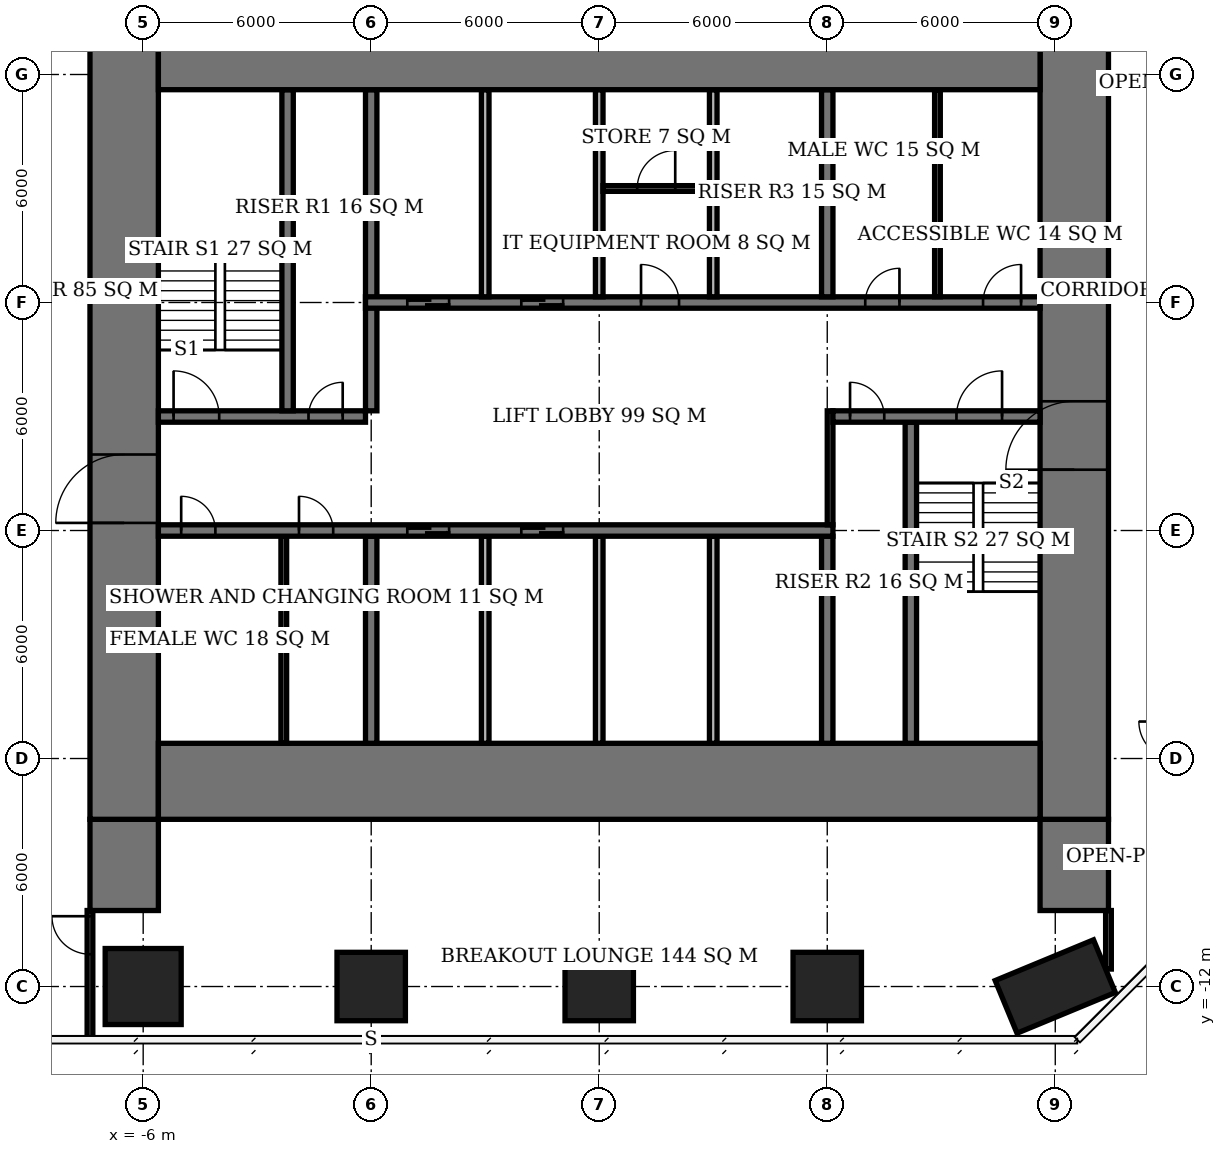
"""IFC4 building model, lengths in metres.
Left out: names, types, materials, properties, quantities, classifications, styles, units other than length and angle.
Written with IfcOpenShell. Run it as: python <this file> out.ifc"""

import sys

from ifc_helpers import new_model, si_unit, direction, frame, frame_2d, origin, origin_2d, place, context, subcontext, project, spatial, rectangle, extrude, element, fill, save


model = new_model("IFC4")
c1 = context("Model", 3, precision=1e-05, world=origin(), true_north=direction((0.0, 1.0)))
c2 = subcontext(c1, "Body", "Model", "MODEL_VIEW")
j1 = project(units=[si_unit("LENGTHUNIT", "METRE"), si_unit("PLANEANGLEUNIT", "RADIAN")], contexts=[c1])
p1 = place(None, origin())
s1 = spatial("IfcSite", under=j1, at=p1, CompositionType="ELEMENT")
p2 = place(p1, origin())
s2 = spatial("IfcBuilding", under=s1, at=p2, CompositionType="ELEMENT")
p3 = place(p2, frame((0.0, 0.0, 105.5)))
s3 = spatial("IfcBuildingStorey", under=s2, at=p3, CompositionType="ELEMENT", Elevation=105.5)
p4 = place(p3, frame((-6.0, -12.0, 0.0), z_axis=(0.0, 0.0, 1.0), x_axis=(1.0, 0.0, 0.0)))
e1 = element("IfcColumn", 1, at=p4, inside=s3, PredefinedType="COLUMN", context=c2, shape_type="SweptSolid", body=[
    extrude(rectangle(XDim=2.0, YDim=2.0, at=origin_2d()), origin(), (0.0, 0.0, 1.0), 3.9),
])
for number, where, z_axis, x_axis in (
    (2, (0.0, -12.0, 0.0), (0.0, 0.0, 1.0), (1.0, 0.0, 0.0)),
    (3, (6.0, -12.0, 0.0), (0.0, 0.0, 1.0), (1.0, 0.0, 0.0)),
    (4, (12.0, -12.0, 0.0), (0.0, 0.0, 1.0), (1.0, 0.0, 0.0)),
):
    element("IfcColumn", number, at=place(p3, frame(where, z_axis=z_axis, x_axis=x_axis)), inside=s3, PredefinedType="COLUMN", context=c2, shape_type="SweptSolid", body=[
        extrude(rectangle(XDim=1.8, YDim=1.8, at=origin_2d()), origin(), (0.0, 0.0, 1.0), 3.9),
    ])
p5 = place(p3, frame((18.0, -12.0, 0.0), z_axis=(0.0, 0.0, 1.0), x_axis=(-0.923879532511, -0.382683432365, 0.0)))
e5 = element("IfcColumn", 5, at=p5, inside=s3, PredefinedType="COLUMN", context=c2, shape_type="SweptSolid", body=[
    extrude(rectangle(XDim=2.8, YDim=1.5, at=origin_2d()), origin(), (0.0, 0.0, 1.0), 3.9),
])
for number, where, z_axis, x_axis in (
    (6, (-5.6, -6.6, 0.0), (0.0, 0.0, 1.0), (1.0, 0.0, 0.0)),
    (7, (-5.6, 12.6, 0.0), (0.0, 0.0, 1.0), (1.0, 0.0, 0.0)),
):
    element("IfcWall", number, at=place(p3, frame(where, z_axis=z_axis, x_axis=x_axis)), inside=s3, PredefinedType="SHEAR", context=c2, shape_type="SweptSolid", body=[
        extrude(rectangle(XDim=23.2, YDim=2.0, at=frame_2d((11.6, 0.0))), origin(), (0.0, 0.0, 1.0), 3.9),
    ])
p6 = place(p3, frame((-6.5, -7.6, 0.0), z_axis=(0.0, 0.0, 1.0), x_axis=(0.0, 1.0, 0.0)))
e8 = element("IfcWall", 8, at=p6, inside=s3, PredefinedType="SHEAR", context=c2, shape_type="SweptSolid", body=[
    extrude(rectangle(XDim=21.2, YDim=1.8, at=frame_2d((10.6, 0.0))), origin(), (0.0, 0.0, 1.0), 3.9),
])
p7 = place(p6, frame((7.8, 0.0, 0.0)))
e9 = element("IfcOpeningElement", 9, at=p7, cuts=e8, PredefinedType="OPENING", context=c2, shape_type="SweptSolid", body=[
    extrude(rectangle(XDim=1.8, YDim=2.4, at=frame_2d((0.9, 1.2))), frame((0.0, 0.91, 0.0), z_axis=(0.0, -1.0, 0.0), x_axis=(1.0, 0.0, 0.0)), (0.0, 0.0, 1.0), 1.82),
])
p8 = place(p3, frame((18.5, -7.6, 0.0), z_axis=(0.0, 0.0, 1.0), x_axis=(0.0, 1.0, 0.0)))
e10 = element("IfcWall", 10, at=p8, inside=s3, PredefinedType="SHEAR", context=c2, shape_type="SweptSolid", body=[
    extrude(rectangle(XDim=21.2, YDim=1.8, at=frame_2d((10.6, 0.0))), origin(), (0.0, 0.0, 1.0), 3.9),
])
p9 = place(p8, frame((9.2, 0.0, 0.0)))
e11 = element("IfcOpeningElement", 11, at=p9, cuts=e10, PredefinedType="OPENING", context=c2, shape_type="SweptSolid", body=[
    extrude(rectangle(XDim=1.8, YDim=2.4, at=frame_2d((0.9, 1.2))), frame((0.0, 0.91, 0.0), z_axis=(0.0, -1.0, 0.0), x_axis=(1.0, 0.0, 0.0)), (0.0, 0.0, 1.0), 1.82),
])
for number, where, z_axis, x_axis in (
    (12, (-6.5, -10.0, 0.0), (0.0, 0.0, 1.0), (0.0, 1.0, 0.0)),
    (13, (18.5, -10.0, 0.0), (0.0, 0.0, 1.0), (0.0, 1.0, 0.0)),
):
    element("IfcWall", number, at=place(p3, frame(where, z_axis=z_axis, x_axis=x_axis)), inside=s3, PredefinedType="SHEAR", context=c2, shape_type="SweptSolid", body=[
        extrude(rectangle(XDim=2.4, YDim=1.8, at=frame_2d((1.2, 0.0))), origin(), (0.0, 0.0, 1.0), 3.9),
    ])
p10 = place(p3, frame((-5.6, 0.0, 0.0), z_axis=(0.0, 0.0, 1.0), x_axis=(1.0, 0.0, 0.0)))
e14 = element("IfcWall", 14, at=p10, inside=s3, PredefinedType="SHEAR", context=c2, shape_type="SweptSolid", body=[
    extrude(rectangle(XDim=17.75, YDim=0.3, at=frame_2d((8.875, 0.0))), origin(), (0.0, 0.0, 1.0), 3.9),
])
p11 = place(p10, frame((0.6, 0.0, 0.0)))
e15 = element("IfcOpeningElement", 15, at=p11, cuts=e14, PredefinedType="OPENING", context=c2, shape_type="SweptSolid", body=[
    extrude(rectangle(XDim=0.9, YDim=2.1, at=frame_2d((0.45, 1.05))), frame((0.0, 0.16, 0.0), z_axis=(0.0, -1.0, 0.0), x_axis=(1.0, 0.0, 0.0)), (0.0, 0.0, 1.0), 0.32),
])
p12 = place(p10, frame((3.7, 0.0, 0.0)))
e16 = element("IfcOpeningElement", 16, at=p12, cuts=e14, PredefinedType="OPENING", context=c2, shape_type="SweptSolid", body=[
    extrude(rectangle(XDim=0.9, YDim=2.1, at=frame_2d((0.45, 1.05))), frame((0.0, 0.16, 0.0), z_axis=(0.0, -1.0, 0.0), x_axis=(1.0, 0.0, 0.0)), (0.0, 0.0, 1.0), 0.32),
])
p13 = place(p10, frame((6.55, 0.0, 0.0)))
e17 = element("IfcOpeningElement", 17, at=p13, cuts=e14, PredefinedType="OPENING", context=c2, shape_type="SweptSolid", body=[
    extrude(rectangle(XDim=1.1, YDim=2.1, at=frame_2d((0.55, 1.05))), frame((0.0, 0.16, 0.0), z_axis=(0.0, -1.0, 0.0), x_axis=(1.0, 0.0, 0.0)), (0.0, 0.0, 1.0), 0.32),
])
p14 = place(p10, frame((9.55, 0.0, 0.0)))
e18 = element("IfcOpeningElement", 18, at=p14, cuts=e14, PredefinedType="OPENING", context=c2, shape_type="SweptSolid", body=[
    extrude(rectangle(XDim=1.1, YDim=2.1, at=frame_2d((0.55, 1.05))), frame((0.0, 0.16, 0.0), z_axis=(0.0, -1.0, 0.0), x_axis=(1.0, 0.0, 0.0)), (0.0, 0.0, 1.0), 0.32),
])
p15 = place(p3, frame((-5.6, 3.0, 0.0), z_axis=(0.0, 0.0, 1.0), x_axis=(1.0, 0.0, 0.0)))
e19 = element("IfcWall", 19, at=p15, inside=s3, PredefinedType="SHEAR", context=c2, shape_type="SweptSolid", body=[
    extrude(rectangle(XDim=5.45, YDim=0.3, at=frame_2d((2.725, 0.0))), origin(), (0.0, 0.0, 1.0), 3.9),
])
p16 = place(p15, frame((0.4, 0.0, 0.0)))
e20 = element("IfcOpeningElement", 20, at=p16, cuts=e19, PredefinedType="OPENING", context=c2, shape_type="SweptSolid", body=[
    extrude(rectangle(XDim=1.2, YDim=2.1, at=frame_2d((0.6, 1.05))), frame((0.0, 0.16, 0.0), z_axis=(0.0, -1.0, 0.0), x_axis=(1.0, 0.0, 0.0)), (0.0, 0.0, 1.0), 0.32),
])
p17 = place(p15, frame((3.95, 0.0, 0.0)))
e21 = element("IfcOpeningElement", 21, at=p17, cuts=e19, PredefinedType="OPENING", context=c2, shape_type="SweptSolid", body=[
    extrude(rectangle(XDim=0.9, YDim=2.1, at=frame_2d((0.45, 1.05))), frame((0.0, 0.16, 0.0), z_axis=(0.0, -1.0, 0.0), x_axis=(1.0, 0.0, 0.0)), (0.0, 0.0, 1.0), 0.32),
])
p18 = place(p3, frame((12.15, 3.0, 0.0), z_axis=(0.0, 0.0, 1.0), x_axis=(1.0, 0.0, 0.0)))
e22 = element("IfcWall", 22, at=p18, inside=s3, PredefinedType="SHEAR", context=c2, shape_type="SweptSolid", body=[
    extrude(rectangle(XDim=5.45, YDim=0.3, at=frame_2d((2.725, 0.0))), origin(), (0.0, 0.0, 1.0), 3.9),
])
p19 = place(p18, frame((3.25, 0.0, 0.0)))
e23 = element("IfcOpeningElement", 23, at=p19, cuts=e22, PredefinedType="OPENING", context=c2, shape_type="SweptSolid", body=[
    extrude(rectangle(XDim=1.2, YDim=2.1, at=frame_2d((0.6, 1.05))), frame((0.0, 0.16, 0.0), z_axis=(0.0, -1.0, 0.0), x_axis=(1.0, 0.0, 0.0)), (0.0, 0.0, 1.0), 0.32),
])
p20 = place(p18, frame((0.45, 0.0, 0.0)))
e24 = element("IfcOpeningElement", 24, at=p20, cuts=e22, PredefinedType="OPENING", context=c2, shape_type="SweptSolid", body=[
    extrude(rectangle(XDim=0.9, YDim=2.1, at=frame_2d((0.45, 1.05))), frame((0.0, 0.16, 0.0), z_axis=(0.0, -1.0, 0.0), x_axis=(1.0, 0.0, 0.0)), (0.0, 0.0, 1.0), 0.32),
])
p21 = place(p3, frame((-0.15, 6.0, 0.0), z_axis=(0.0, 0.0, 1.0), x_axis=(1.0, 0.0, 0.0)))
e25 = element("IfcWall", 25, at=p21, inside=s3, PredefinedType="SHEAR", context=c2, shape_type="SweptSolid", body=[
    extrude(rectangle(XDim=17.75, YDim=0.3, at=frame_2d((8.875, 0.0))), origin(), (0.0, 0.0, 1.0), 3.9),
])
p22 = place(p21, frame((13.15, 0.0, 0.0)))
e26 = element("IfcOpeningElement", 26, at=p22, cuts=e25, PredefinedType="OPENING", context=c2, shape_type="SweptSolid", body=[
    extrude(rectangle(XDim=0.9, YDim=2.1, at=frame_2d((0.45, 1.05))), frame((0.0, 0.16, 0.0), z_axis=(0.0, -1.0, 0.0), x_axis=(1.0, 0.0, 0.0)), (0.0, 0.0, 1.0), 0.32),
])
p23 = place(p21, frame((16.25, 0.0, 0.0)))
e27 = element("IfcOpeningElement", 27, at=p23, cuts=e25, PredefinedType="OPENING", context=c2, shape_type="SweptSolid", body=[
    extrude(rectangle(XDim=1.0, YDim=2.1, at=frame_2d((0.5, 1.05))), frame((0.0, 0.16, 0.0), z_axis=(0.0, -1.0, 0.0), x_axis=(1.0, 0.0, 0.0)), (0.0, 0.0, 1.0), 0.32),
])
p24 = place(p21, frame((7.25, 0.0, 0.0)))
e28 = element("IfcOpeningElement", 28, at=p24, cuts=e25, PredefinedType="OPENING", context=c2, shape_type="SweptSolid", body=[
    extrude(rectangle(XDim=1.0, YDim=2.1, at=frame_2d((0.5, 1.05))), frame((0.0, 0.16, 0.0), z_axis=(0.0, -1.0, 0.0), x_axis=(1.0, 0.0, 0.0)), (0.0, 0.0, 1.0), 0.32),
])
p25 = place(p21, frame((1.1, 0.0, 0.0)))
e29 = element("IfcOpeningElement", 29, at=p25, cuts=e25, PredefinedType="OPENING", context=c2, shape_type="SweptSolid", body=[
    extrude(rectangle(XDim=1.1, YDim=2.1, at=frame_2d((0.55, 1.05))), frame((0.0, 0.16, 0.0), z_axis=(0.0, -1.0, 0.0), x_axis=(1.0, 0.0, 0.0)), (0.0, 0.0, 1.0), 0.32),
])
p26 = place(p21, frame((4.1, 0.0, 0.0)))
e30 = element("IfcOpeningElement", 30, at=p26, cuts=e25, PredefinedType="OPENING", context=c2, shape_type="SweptSolid", body=[
    extrude(rectangle(XDim=1.1, YDim=2.1, at=frame_2d((0.55, 1.05))), frame((0.0, 0.16, 0.0), z_axis=(0.0, -1.0, 0.0), x_axis=(1.0, 0.0, 0.0)), (0.0, 0.0, 1.0), 0.32),
])
p27 = place(p3, frame((0.0, -5.6, 0.0), z_axis=(0.0, 0.0, 1.0), x_axis=(0.0, 1.0, 0.0)))
e31 = element("IfcWall", 31, at=p27, inside=s3, PredefinedType="SHEAR", context=c2, shape_type="SweptSolid", body=[
    extrude(rectangle(XDim=5.45, YDim=0.3, at=frame_2d((2.725, 0.0))), origin(), (0.0, 0.0, 1.0), 3.9),
])
p28 = place(p3, frame((0.0, 3.15, 0.0), z_axis=(0.0, 0.0, 1.0), x_axis=(0.0, 1.0, 0.0)))
e32 = element("IfcWall", 32, at=p28, inside=s3, PredefinedType="SHEAR", context=c2, shape_type="SweptSolid", body=[
    extrude(rectangle(XDim=8.45, YDim=0.3, at=frame_2d((4.225, 0.0))), origin(), (0.0, 0.0, 1.0), 3.9),
])
for number, where, z_axis, x_axis in (
    (33, (12.0, -5.6, 0.0), (0.0, 0.0, 1.0), (0.0, 1.0, 0.0)),
    (34, (12.0, 6.15, 0.0), (0.0, 0.0, 1.0), (0.0, 1.0, 0.0)),
):
    element("IfcWall", number, at=place(p3, frame(where, z_axis=z_axis, x_axis=x_axis)), inside=s3, PredefinedType="SHEAR", context=c2, shape_type="SweptSolid", body=[
        extrude(rectangle(XDim=5.45, YDim=0.3, at=frame_2d((2.725, 0.0))), origin(), (0.0, 0.0, 1.0), 3.9),
    ])
for number, where, z_axis, x_axis in (
    (35, (-2.2, 3.15, 0.0), (0.0, 0.0, 1.0), (0.0, 1.0, 0.0)),
    (36, (14.2, -5.6, 0.0), (0.0, 0.0, 1.0), (0.0, 1.0, 0.0)),
):
    element("IfcWall", number, at=place(p3, frame(where, z_axis=z_axis, x_axis=x_axis)), inside=s3, PredefinedType="SHEAR", context=c2, shape_type="SweptSolid", body=[
        extrude(rectangle(XDim=8.45, YDim=0.3, at=frame_2d((4.225, 0.0))), origin(), (0.0, 0.0, 1.0), 3.9),
    ])
for number, where, z_axis, x_axis in (
    (37, (3.0, 6.15, 0.0), (0.0, 0.0, 1.0), (0.0, 1.0, 0.0)),
    (38, (6.0, 6.15, 0.0), (0.0, 0.0, 1.0), (0.0, 1.0, 0.0)),
    (39, (9.0, 6.15, 0.0), (0.0, 0.0, 1.0), (0.0, 1.0, 0.0)),
    (40, (3.0, -5.6, 0.0), (0.0, 0.0, 1.0), (0.0, 1.0, 0.0)),
    (41, (6.0, -5.6, 0.0), (0.0, 0.0, 1.0), (0.0, 1.0, 0.0)),
    (42, (9.0, -5.6, 0.0), (0.0, 0.0, 1.0), (0.0, 1.0, 0.0)),
):
    element("IfcWall", number, at=place(p3, frame(where, z_axis=z_axis, x_axis=x_axis)), inside=s3, PredefinedType="SOLIDWALL", context=c2, shape_type="SweptSolid", body=[
        extrude(rectangle(XDim=5.45, YDim=0.2, at=frame_2d((2.725, 0.0))), origin(), (0.0, 0.0, 1.0), 3.9),
    ])
for number, where, z_axis, x_axis in (
    (43, (-2.3, -5.6, 0.0), (0.0, 0.0, 1.0), (0.0, 1.0, 0.0)),
    (44, (14.9, 6.15, 0.0), (0.0, 0.0, 1.0), (0.0, 1.0, 0.0)),
):
    element("IfcWall", number, at=place(p3, frame(where, z_axis=z_axis, x_axis=x_axis)), inside=s3, PredefinedType="PLUMBINGWALL", context=c2, shape_type="SweptSolid", body=[
        extrude(rectangle(XDim=5.45, YDim=0.15, at=frame_2d((2.725, 0.0))), origin(), (0.0, 0.0, 1.0), 3.65),
    ])
p29 = place(p3, frame((6.1, 9.0, 0.0), z_axis=(0.0, 0.0, 1.0), x_axis=(1.0, 0.0, 0.0)))
e45 = element("IfcWall", 45, at=p29, inside=s3, PredefinedType="PARTITIONING", context=c2, shape_type="SweptSolid", body=[
    extrude(rectangle(XDim=2.8, YDim=0.15, at=frame_2d((1.4, 0.0))), origin(), (0.0, 0.0, 1.0), 3.65),
])
p30 = place(p29, frame((0.9, 0.0, 0.0)))
e46 = element("IfcOpeningElement", 46, at=p30, cuts=e45, PredefinedType="OPENING", context=c2, shape_type="SweptSolid", body=[
    extrude(rectangle(XDim=1.0, YDim=2.1, at=frame_2d((0.5, 1.05))), frame((0.0, 0.085, 0.0), z_axis=(0.0, -1.0, 0.0), x_axis=(1.0, 0.0, 0.0)), (0.0, 0.0, 1.0), 0.17),
])
p31 = place(p3, frame((-7.4, -13.4, 0.0), z_axis=(0.0, 0.0, 1.0), x_axis=(0.0, 1.0, 0.0)))
e47 = element("IfcWall", 47, at=p31, inside=s3, PredefinedType="PARTITIONING", context=c2, shape_type="SweptSolid", body=[
    extrude(rectangle(XDim=3.4, YDim=0.15, at=frame_2d((1.7, 0.0))), origin(), (0.0, 0.0, 1.0), 3.65),
])
p32 = place(p31, frame((2.25, 0.0, 0.0)))
e48 = element("IfcOpeningElement", 48, at=p32, cuts=e47, PredefinedType="OPENING", context=c2, shape_type="SweptSolid", body=[
    extrude(rectangle(XDim=1.0, YDim=2.1, at=frame_2d((0.5, 1.05))), frame((0.0, 0.085, 0.0), z_axis=(0.0, -1.0, 0.0), x_axis=(1.0, 0.0, 0.0)), (0.0, 0.0, 1.0), 0.17),
])
p33 = place(p3, frame((19.4, -11.541, 0.0), z_axis=(0.0, 0.0, 1.0), x_axis=(0.0, 1.0, 0.0)))
e49 = element("IfcWall", 49, at=p33, inside=s3, PredefinedType="PARTITIONING", context=c2, shape_type="SweptSolid", body=[
    extrude(rectangle(XDim=1.541, YDim=0.15, at=frame_2d((0.77, 0.0))), origin(), (0.0, 0.0, 1.0), 3.65),
])
p34 = place(p3, frame((12.075, 0.15, 0.0), z_axis=(0.0, 0.0, 1.0), x_axis=(0.0, 1.0, 0.0)))
e50 = element("IfcWall", 50, at=p34, inside=s3, PredefinedType="PARTITIONING", context=c2, shape_type="SweptSolid", body=[
    extrude(rectangle(XDim=3.0, YDim=0.15, at=frame_2d((1.5, 0.0))), origin(), (0.0, 0.0, 1.0), 3.65),
])
p35 = place(p7, origin())
e51 = element("IfcDoor", 51, at=p35, inside=s3, OperationType="DOUBLE_DOOR_SINGLE_SWING", PredefinedType="DOOR", context=c2, shape_type="SweptSolid", body=[
    extrude(rectangle(XDim=1.8, YDim=2.4, at=frame_2d((0.9, 1.2))), frame((0.0, 0.025, 0.0), z_axis=(0.0, -1.0, 0.0), x_axis=(1.0, 0.0, 0.0)), (0.0, 0.0, 1.0), 0.05),
])
fill(e9, e51)
p36 = place(p9, origin())
e52 = element("IfcDoor", 52, at=p36, inside=s3, OperationType="DOUBLE_DOOR_SINGLE_SWING", PredefinedType="DOOR", context=c2, shape_type="SweptSolid", body=[
    extrude(rectangle(XDim=1.8, YDim=2.4, at=frame_2d((0.9, 1.2))), frame((0.0, 0.025, 0.0), z_axis=(0.0, -1.0, 0.0), x_axis=(1.0, 0.0, 0.0)), (0.0, 0.0, 1.0), 0.05),
])
fill(e11, e52)
p37 = place(p16, origin())
e53 = element("IfcDoor", 53, at=p37, inside=s3, OperationType="SINGLE_SWING_LEFT", PredefinedType="DOOR", context=c2, shape_type="SweptSolid", body=[
    extrude(rectangle(XDim=1.2, YDim=2.1, at=frame_2d((0.6, 1.05))), frame((0.0, 0.025, 0.0), z_axis=(0.0, -1.0, 0.0), x_axis=(1.0, 0.0, 0.0)), (0.0, 0.0, 1.0), 0.05),
])
fill(e20, e53)
p38 = place(p17, origin())
e54 = element("IfcDoor", 54, at=p38, inside=s3, OperationType="SINGLE_SWING_RIGHT", PredefinedType="DOOR", context=c2, shape_type="SweptSolid", body=[
    extrude(rectangle(XDim=0.9, YDim=2.1, at=frame_2d((0.45, 1.05))), frame((0.0, 0.025, 0.0), z_axis=(0.0, -1.0, 0.0), x_axis=(1.0, 0.0, 0.0)), (0.0, 0.0, 1.0), 0.05),
])
fill(e21, e54)
p39 = place(p19, origin())
e55 = element("IfcDoor", 55, at=p39, inside=s3, OperationType="SINGLE_SWING_RIGHT", PredefinedType="DOOR", context=c2, shape_type="SweptSolid", body=[
    extrude(rectangle(XDim=1.2, YDim=2.1, at=frame_2d((0.6, 1.05))), frame((0.0, 0.025, 0.0), z_axis=(0.0, -1.0, 0.0), x_axis=(1.0, 0.0, 0.0)), (0.0, 0.0, 1.0), 0.05),
])
fill(e23, e55)
p40 = place(p20, origin())
e56 = element("IfcDoor", 56, at=p40, inside=s3, OperationType="SINGLE_SWING_LEFT", PredefinedType="DOOR", context=c2, shape_type="SweptSolid", body=[
    extrude(rectangle(XDim=0.9, YDim=2.1, at=frame_2d((0.45, 1.05))), frame((0.0, 0.025, 0.0), z_axis=(0.0, -1.0, 0.0), x_axis=(1.0, 0.0, 0.0)), (0.0, 0.0, 1.0), 0.05),
])
fill(e24, e56)
p41 = place(p11, origin())
e57 = element("IfcDoor", 57, at=p41, inside=s3, OperationType="SINGLE_SWING_LEFT", PredefinedType="DOOR", context=c2, shape_type="SweptSolid", body=[
    extrude(rectangle(XDim=0.9, YDim=2.1, at=frame_2d((0.45, 1.05))), frame((0.0, 0.025, 0.0), z_axis=(0.0, -1.0, 0.0), x_axis=(1.0, 0.0, 0.0)), (0.0, 0.0, 1.0), 0.05),
])
fill(e15, e57)
p42 = place(p12, origin())
e58 = element("IfcDoor", 58, at=p42, inside=s3, OperationType="SINGLE_SWING_LEFT", PredefinedType="DOOR", context=c2, shape_type="SweptSolid", body=[
    extrude(rectangle(XDim=0.9, YDim=2.1, at=frame_2d((0.45, 1.05))), frame((0.0, 0.025, 0.0), z_axis=(0.0, -1.0, 0.0), x_axis=(1.0, 0.0, 0.0)), (0.0, 0.0, 1.0), 0.05),
])
fill(e16, e58)
p43 = place(p22, origin())
e59 = element("IfcDoor", 59, at=p43, inside=s3, OperationType="SINGLE_SWING_RIGHT", PredefinedType="DOOR", context=c2, shape_type="SweptSolid", body=[
    extrude(rectangle(XDim=0.9, YDim=2.1, at=frame_2d((0.45, 1.05))), frame((0.0, 0.025, 0.0), z_axis=(0.0, -1.0, 0.0), x_axis=(1.0, 0.0, 0.0)), (0.0, 0.0, 1.0), 0.05),
])
fill(e26, e59)
p44 = place(p23, origin())
e60 = element("IfcDoor", 60, at=p44, inside=s3, OperationType="SINGLE_SWING_RIGHT", PredefinedType="DOOR", context=c2, shape_type="SweptSolid", body=[
    extrude(rectangle(XDim=1.0, YDim=2.1, at=frame_2d((0.5, 1.05))), frame((0.0, 0.025, 0.0), z_axis=(0.0, -1.0, 0.0), x_axis=(1.0, 0.0, 0.0)), (0.0, 0.0, 1.0), 0.05),
])
fill(e27, e60)
p45 = place(p30, origin())
e61 = element("IfcDoor", 61, at=p45, inside=s3, OperationType="SINGLE_SWING_RIGHT", PredefinedType="DOOR", context=c2, shape_type="SweptSolid", body=[
    extrude(rectangle(XDim=1.0, YDim=2.1, at=frame_2d((0.5, 1.05))), frame((0.0, 0.025, 0.0), z_axis=(0.0, -1.0, 0.0), x_axis=(1.0, 0.0, 0.0)), (0.0, 0.0, 1.0), 0.05),
])
fill(e46, e61)
p46 = place(p24, origin())
e62 = element("IfcDoor", 62, at=p46, inside=s3, OperationType="SINGLE_SWING_LEFT", PredefinedType="DOOR", context=c2, shape_type="SweptSolid", body=[
    extrude(rectangle(XDim=1.0, YDim=2.1, at=frame_2d((0.5, 1.05))), frame((0.0, 0.025, 0.0), z_axis=(0.0, -1.0, 0.0), x_axis=(1.0, 0.0, 0.0)), (0.0, 0.0, 1.0), 0.05),
])
fill(e28, e62)
p47 = place(p25, origin())
e63 = element("IfcDoor", 63, at=p47, inside=s3, OperationType="DOUBLE_DOOR_SLIDING", PredefinedType="USERDEFINED", context=c2, shape_type="SweptSolid", body=[
    extrude(rectangle(XDim=1.1, YDim=2.1, at=frame_2d((0.55, 1.05))), frame((0.0, 0.025, 0.0), z_axis=(0.0, -1.0, 0.0), x_axis=(1.0, 0.0, 0.0)), (0.0, 0.0, 1.0), 0.05),
])
fill(e29, e63)
p48 = place(p26, origin())
e64 = element("IfcDoor", 64, at=p48, inside=s3, OperationType="DOUBLE_DOOR_SLIDING", PredefinedType="USERDEFINED", context=c2, shape_type="SweptSolid", body=[
    extrude(rectangle(XDim=1.1, YDim=2.1, at=frame_2d((0.55, 1.05))), frame((0.0, 0.025, 0.0), z_axis=(0.0, -1.0, 0.0), x_axis=(1.0, 0.0, 0.0)), (0.0, 0.0, 1.0), 0.05),
])
fill(e30, e64)
p49 = place(p13, origin())
e65 = element("IfcDoor", 65, at=p49, inside=s3, OperationType="DOUBLE_DOOR_SLIDING", PredefinedType="USERDEFINED", context=c2, shape_type="SweptSolid", body=[
    extrude(rectangle(XDim=1.1, YDim=2.1, at=frame_2d((0.55, 1.05))), frame((0.0, 0.025, 0.0), z_axis=(0.0, -1.0, 0.0), x_axis=(1.0, 0.0, 0.0)), (0.0, 0.0, 1.0), 0.05),
])
fill(e17, e65)
p50 = place(p14, origin())
e66 = element("IfcDoor", 66, at=p50, inside=s3, OperationType="DOUBLE_DOOR_SLIDING", PredefinedType="USERDEFINED", context=c2, shape_type="SweptSolid", body=[
    extrude(rectangle(XDim=1.1, YDim=2.1, at=frame_2d((0.55, 1.05))), frame((0.0, 0.025, 0.0), z_axis=(0.0, -1.0, 0.0), x_axis=(1.0, 0.0, 0.0)), (0.0, 0.0, 1.0), 0.05),
])
fill(e18, e66)
p51 = place(p32, origin())
e67 = element("IfcDoor", 67, at=p51, inside=s3, OperationType="SINGLE_SWING_RIGHT", PredefinedType="DOOR", context=c2, shape_type="SweptSolid", body=[
    extrude(rectangle(XDim=1.0, YDim=2.1, at=frame_2d((0.5, 1.05))), frame((0.0, 0.025, 0.0), z_axis=(0.0, -1.0, 0.0), x_axis=(1.0, 0.0, 0.0)), (0.0, 0.0, 1.0), 0.05),
])
fill(e48, e67)
save(model, sys.argv[1])
